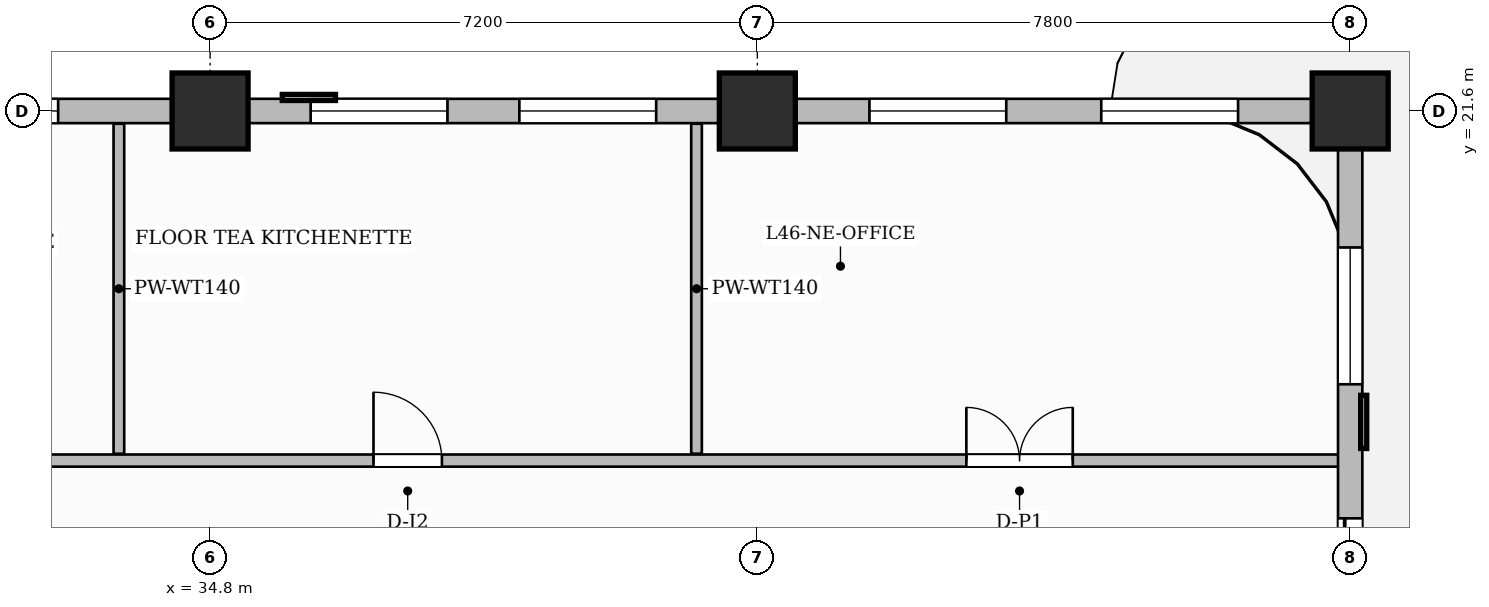
"""IFC4 building model, lengths in metres.
Left out: names, types, materials, properties, quantities, classifications, styles, units other than length and angle.
Written with IfcOpenShell. Run it as: python <this file> out.ifc"""

import sys

from ifc_helpers import new_model, si_unit, direction, frame, frame_2d, origin, origin_2d, place, context, subcontext, project, spatial, rectangle, extrude, source, transform, mapped, element, fill, save


model = new_model("IFC4")
c1 = context("Model", 3, precision=1e-05, world=origin(), true_north=direction((0.0, 1.0)))
c2 = subcontext(c1, "Body", "Model", "MODEL_VIEW")
j1 = project(units=[si_unit("LENGTHUNIT", "METRE"), si_unit("PLANEANGLEUNIT", "RADIAN")], contexts=[c1])
p1 = place(None, origin())
s1 = spatial("IfcSite", under=j1, at=p1, CompositionType="ELEMENT")
p2 = place(p1, origin())
s2 = spatial("IfcBuilding", under=s1, at=p2, CompositionType="ELEMENT")
p3 = place(p2, frame((0.0, 0.0, 184.95)))
s3 = spatial("IfcBuildingStorey", under=s2, at=p3, CompositionType="ELEMENT", Elevation=184.95)
m1 = source(origin(), c2, "Body", "SweptSolid", [
    extrude(rectangle(XDim=1.0, YDim=1.0, at=origin_2d()), origin(), (0.0, 0.0, 1.0), 3.85),
])
for number, where, z_axis, x_axis in (
    (1, (34.8, 21.6, 0.0), (0.0, 0.0, 1.0), (1.0, 0.0, 0.0)),
    (2, (42.0, 21.6, 0.0), (0.0, 0.0, 1.0), (1.0, 0.0, 0.0)),
    (3, (49.8, 21.6, 0.0), (0.0, 0.0, 1.0), (1.0, 0.0, 0.0)),
):
    element("IfcColumn", number, at=place(p3, frame(where, z_axis=z_axis, x_axis=x_axis)), inside=s3, PredefinedType="COLUMN", context=c2, shape_type="MappedRepresentation", body=[
        mapped(m1, transform((0.0, 0.0, 0.0), scale=1.0)),
    ])
p4 = place(p3, frame((30.29, 17.0, 0.0), z_axis=(0.0, 0.0, 1.0), x_axis=(1.0, 0.0, 0.0)))
e4 = element("IfcWall", 4, at=p4, inside=s3, PredefinedType="PARTITIONING", context=c2, shape_type="SweptSolid", body=[
    extrude(rectangle(XDim=19.37, YDim=0.16, at=frame_2d((9.685, 0.0))), origin(), (0.0, 0.0, 1.0), 3.6),
])
p5 = place(p4, frame((1.185, 0.0, 0.0)))
e5 = element("IfcOpeningElement", 5, at=p5, cuts=e4, PredefinedType="OPENING", context=c2, shape_type="SweptSolid", body=[
    extrude(rectangle(XDim=0.85, YDim=2.1, at=frame_2d((0.425, 1.05))), frame((0.0, 0.09, 0.0), z_axis=(0.0, -1.0, 0.0), x_axis=(1.0, 0.0, 0.0)), (0.0, 0.0, 1.0), 0.18),
])
p6 = place(p4, frame((6.66, 0.0, 0.0)))
e6 = element("IfcOpeningElement", 6, at=p6, cuts=e4, PredefinedType="OPENING", context=c2, shape_type="SweptSolid", body=[
    extrude(rectangle(XDim=0.9, YDim=2.15, at=frame_2d((0.45, 1.075))), frame((0.0, 0.09, 0.0), z_axis=(0.0, -1.0, 0.0), x_axis=(1.0, 0.0, 0.0)), (0.0, 0.0, 1.0), 0.18),
])
p7 = place(p4, frame((14.46, 0.0, 0.0)))
e7 = element("IfcOpeningElement", 7, at=p7, cuts=e4, PredefinedType="OPENING", context=c2, shape_type="SweptSolid", body=[
    extrude(rectangle(XDim=1.4, YDim=2.35, at=frame_2d((0.7, 1.175))), frame((0.0, 0.09, 0.0), z_axis=(0.0, -1.0, 0.0), x_axis=(1.0, 0.0, 0.0)), (0.0, 0.0, 1.0), 0.18),
])
for number, where, z_axis, x_axis in (
    (8, (33.6, 17.09, 0.0), (0.0, 0.0, 1.0), (0.0, 1.0, 0.0)),
    (9, (41.2, 17.09, 0.0), (0.0, 0.0, 1.0), (0.0, 1.0, 0.0)),
):
    element("IfcWall", number, at=place(p3, frame(where, z_axis=z_axis, x_axis=x_axis)), inside=s3, PredefinedType="PARTITIONING", context=c2, shape_type="SweptSolid", body=[
        extrude(rectangle(XDim=4.342, YDim=0.14, at=frame_2d((2.171, 0.0))), origin(), (0.0, 0.0, 1.0), 3.6),
    ])
p8 = place(p3, frame((49.8, 14.62, 0.0), z_axis=(0.0, 0.0, 1.0), x_axis=(0.0, 1.0, 0.0)))
e10 = element("IfcWall", 10, at=p8, inside=s3, PredefinedType="SOLIDWALL", context=c2, shape_type="SweptSolid", body=[
    extrude(rectangle(XDim=6.93, YDim=0.32, at=frame_2d((3.465, 0.0))), origin(), (0.0, 0.0, 1.0), 3.085),
])
p9 = place(p8, frame((0.42, 0.0, 0.0)))
e11 = element("IfcOpeningElement", 11, at=p9, cuts=e10, PredefinedType="OPENING", context=c2, shape_type="SweptSolid", body=[
    extrude(rectangle(XDim=1.2, YDim=2.2, at=frame_2d((0.6, 1.1))), frame((0.0, 0.17, 0.0), z_axis=(0.0, -1.0, 0.0), x_axis=(1.0, 0.0, 0.0)), (0.0, 0.0, 1.0), 0.34),
])
p10 = place(p8, frame((3.384, 0.0, 0.8)))
e12 = element("IfcOpeningElement", 12, at=p10, cuts=e10, PredefinedType="OPENING", context=c2, shape_type="SweptSolid", body=[
    extrude(rectangle(XDim=1.8, YDim=1.85, at=frame_2d((0.9, 0.925))), frame((0.0, 0.17, 0.0), z_axis=(0.0, -1.0, 0.0), x_axis=(1.0, 0.0, 0.0)), (0.0, 0.0, 1.0), 0.34),
])
p11 = place(p3, frame((18.0, 21.6, 0.0), z_axis=(0.0, 0.0, 1.0), x_axis=(1.0, 0.0, 0.0)))
e13 = element("IfcWall", 13, at=p11, inside=s3, PredefinedType="SOLIDWALL", context=c2, shape_type="SweptSolid", body=[
    extrude(rectangle(XDim=31.8, YDim=0.32, at=frame_2d((15.9, 0.0))), origin(), (0.0, 0.0, 1.0), 3.085),
])
p12 = place(p11, frame((0.885, 0.0, 0.8)))
e14 = element("IfcOpeningElement", 14, at=p12, cuts=e13, PredefinedType="OPENING", context=c2, shape_type="SweptSolid", body=[
    extrude(rectangle(XDim=1.4, YDim=1.85, at=frame_2d((0.7, 0.925))), frame((0.0, 0.17, 0.0), z_axis=(0.0, -1.0, 0.0), x_axis=(1.0, 0.0, 0.0)), (0.0, 0.0, 1.0), 0.34),
])
p13 = place(p11, frame((4.581, 0.0, 0.8)))
e15 = element("IfcOpeningElement", 15, at=p13, cuts=e13, PredefinedType="OPENING", context=c2, shape_type="SweptSolid", body=[
    extrude(rectangle(XDim=0.95, YDim=1.75, at=frame_2d((0.475, 0.875))), frame((0.0, 0.17, 0.0), z_axis=(0.0, -1.0, 0.0), x_axis=(1.0, 0.0, 0.0)), (0.0, 0.0, 1.0), 0.34),
])
p14 = place(p11, frame((6.21, 0.0, 0.8)))
e16 = element("IfcOpeningElement", 16, at=p14, cuts=e13, PredefinedType="OPENING", context=c2, shape_type="SweptSolid", body=[
    extrude(rectangle(XDim=1.4, YDim=1.85, at=frame_2d((0.7, 0.925))), frame((0.0, 0.17, 0.0), z_axis=(0.0, -1.0, 0.0), x_axis=(1.0, 0.0, 0.0)), (0.0, 0.0, 1.0), 0.34),
])
p15 = place(p11, frame((8.48, 0.0, 0.8)))
e17 = element("IfcOpeningElement", 17, at=p15, cuts=e13, PredefinedType="OPENING", context=c2, shape_type="SweptSolid", body=[
    extrude(rectangle(XDim=1.15, YDim=1.8, at=frame_2d((0.575, 0.9))), frame((0.0, 0.17, 0.0), z_axis=(0.0, -1.0, 0.0), x_axis=(1.0, 0.0, 0.0)), (0.0, 0.0, 1.0), 0.34),
])
p16 = place(p11, frame((13.001, 0.0, 0.8)))
e18 = element("IfcOpeningElement", 18, at=p16, cuts=e13, PredefinedType="OPENING", context=c2, shape_type="SweptSolid", body=[
    extrude(rectangle(XDim=1.8, YDim=1.85, at=frame_2d((0.9, 0.925))), frame((0.0, 0.17, 0.0), z_axis=(0.0, -1.0, 0.0), x_axis=(1.0, 0.0, 0.0)), (0.0, 0.0, 1.0), 0.34),
])
p17 = place(p11, frame((18.123, 0.0, 0.8)))
e19 = element("IfcOpeningElement", 19, at=p17, cuts=e13, PredefinedType="OPENING", context=c2, shape_type="SweptSolid", body=[
    extrude(rectangle(XDim=1.8, YDim=1.85, at=frame_2d((0.9, 0.925))), frame((0.0, 0.17, 0.0), z_axis=(0.0, -1.0, 0.0), x_axis=(1.0, 0.0, 0.0)), (0.0, 0.0, 1.0), 0.34),
])
p18 = place(p11, frame((20.869, 0.0, 0.8)))
e20 = element("IfcOpeningElement", 20, at=p18, cuts=e13, PredefinedType="OPENING", context=c2, shape_type="SweptSolid", body=[
    extrude(rectangle(XDim=1.8, YDim=1.85, at=frame_2d((0.9, 0.925))), frame((0.0, 0.17, 0.0), z_axis=(0.0, -1.0, 0.0), x_axis=(1.0, 0.0, 0.0)), (0.0, 0.0, 1.0), 0.34),
])
p19 = place(p11, frame((25.475, 0.0, 0.8)))
e21 = element("IfcOpeningElement", 21, at=p19, cuts=e13, PredefinedType="OPENING", context=c2, shape_type="SweptSolid", body=[
    extrude(rectangle(XDim=1.8, YDim=1.85, at=frame_2d((0.9, 0.925))), frame((0.0, 0.17, 0.0), z_axis=(0.0, -1.0, 0.0), x_axis=(1.0, 0.0, 0.0)), (0.0, 0.0, 1.0), 0.34),
])
p20 = place(p11, frame((28.525, 0.0, 0.8)))
e22 = element("IfcOpeningElement", 22, at=p20, cuts=e13, PredefinedType="OPENING", context=c2, shape_type="SweptSolid", body=[
    extrude(rectangle(XDim=1.8, YDim=1.85, at=frame_2d((0.9, 0.925))), frame((0.0, 0.17, 0.0), z_axis=(0.0, -1.0, 0.0), x_axis=(1.0, 0.0, 0.0)), (0.0, 0.0, 1.0), 0.34),
])
m2 = source(origin(), c2, "Body", "SweptSolid", [
    extrude(rectangle(XDim=0.9, YDim=2.15, at=frame_2d((0.45, 1.075))), frame((0.0, 0.025, 0.0), z_axis=(0.0, -1.0, 0.0), x_axis=(1.0, 0.0, 0.0)), (0.0, 0.0, 1.0), 0.05),
])
p21 = place(p6, origin())
e23 = element("IfcDoor", 23, at=p21, inside=s3, OperationType="SINGLE_SWING_LEFT", PredefinedType="DOOR", context=c2, shape_type="MappedRepresentation", body=[
    mapped(m2, transform((0.0, 0.0, 0.0), scale=1.0)),
])
fill(e6, e23)
m3 = source(origin(), c2, "Body", "SweptSolid", [
    extrude(rectangle(XDim=1.4, YDim=2.35, at=frame_2d((0.7, 1.175))), frame((0.0, 0.025, 0.0), z_axis=(0.0, -1.0, 0.0), x_axis=(1.0, 0.0, 0.0)), (0.0, 0.0, 1.0), 0.05),
])
p22 = place(p7, origin())
e24 = element("IfcDoor", 24, at=p22, inside=s3, OperationType="DOUBLE_DOOR_SINGLE_SWING", PredefinedType="DOOR", context=c2, shape_type="MappedRepresentation", body=[
    mapped(m3, transform((0.0, 0.0, 0.0), scale=1.0)),
])
fill(e7, e24)
m4 = source(origin(), c2, "Body", "SweptSolid", [
    extrude(rectangle(XDim=1.2, YDim=2.2, at=frame_2d((0.6, 1.1))), frame((0.0, 0.025, 0.0), z_axis=(0.0, -1.0, 0.0), x_axis=(1.0, 0.0, 0.0)), (0.0, 0.0, 1.0), 0.05),
])
p23 = place(p9, origin())
e25 = element("IfcDoor", 25, at=p23, inside=s3, OperationType="SLIDING_TO_LEFT", PredefinedType="DOOR", context=c2, shape_type="MappedRepresentation", body=[
    mapped(m4, transform((0.0, 0.0, 0.0), scale=1.0)),
])
fill(e11, e25)
m5 = source(origin(), c2, "Body", "SweptSolid", [
    extrude(rectangle(XDim=1.8, YDim=1.85, at=frame_2d((0.9, 0.925))), frame((0.0, 0.03, 0.0), z_axis=(0.0, -1.0, 0.0), x_axis=(1.0, 0.0, 0.0)), (0.0, 0.0, 1.0), 0.06),
])
p24 = place(p10, origin())
e26 = element("IfcWindow", 26, at=p24, inside=s3, PartitioningType="DOUBLE_PANEL_VERTICAL", PredefinedType="WINDOW", context=c2, shape_type="MappedRepresentation", body=[
    mapped(m5, transform((0.0, 0.0, 0.0), scale=1.0)),
])
fill(e12, e26)
p25 = place(p16, origin())
e27 = element("IfcWindow", 27, at=p25, inside=s3, PartitioningType="DOUBLE_PANEL_VERTICAL", PredefinedType="WINDOW", context=c2, shape_type="MappedRepresentation", body=[
    mapped(m5, transform((0.0, 0.0, 0.0), scale=1.0)),
])
fill(e18, e27)
p26 = place(p17, origin())
e28 = element("IfcWindow", 28, at=p26, inside=s3, PartitioningType="DOUBLE_PANEL_VERTICAL", PredefinedType="WINDOW", context=c2, shape_type="MappedRepresentation", body=[
    mapped(m5, transform((0.0, 0.0, 0.0), scale=1.0)),
])
fill(e19, e28)
p27 = place(p18, origin())
e29 = element("IfcWindow", 29, at=p27, inside=s3, PartitioningType="DOUBLE_PANEL_VERTICAL", PredefinedType="WINDOW", context=c2, shape_type="MappedRepresentation", body=[
    mapped(m5, transform((0.0, 0.0, 0.0), scale=1.0)),
])
fill(e20, e29)
p28 = place(p19, origin())
e30 = element("IfcWindow", 30, at=p28, inside=s3, PartitioningType="DOUBLE_PANEL_VERTICAL", PredefinedType="WINDOW", context=c2, shape_type="MappedRepresentation", body=[
    mapped(m5, transform((0.0, 0.0, 0.0), scale=1.0)),
])
fill(e21, e30)
p29 = place(p20, origin())
e31 = element("IfcWindow", 31, at=p29, inside=s3, PartitioningType="DOUBLE_PANEL_VERTICAL", PredefinedType="WINDOW", context=c2, shape_type="MappedRepresentation", body=[
    mapped(m5, transform((0.0, 0.0, 0.0), scale=1.0)),
])
fill(e22, e31)
save(model, sys.argv[1])
